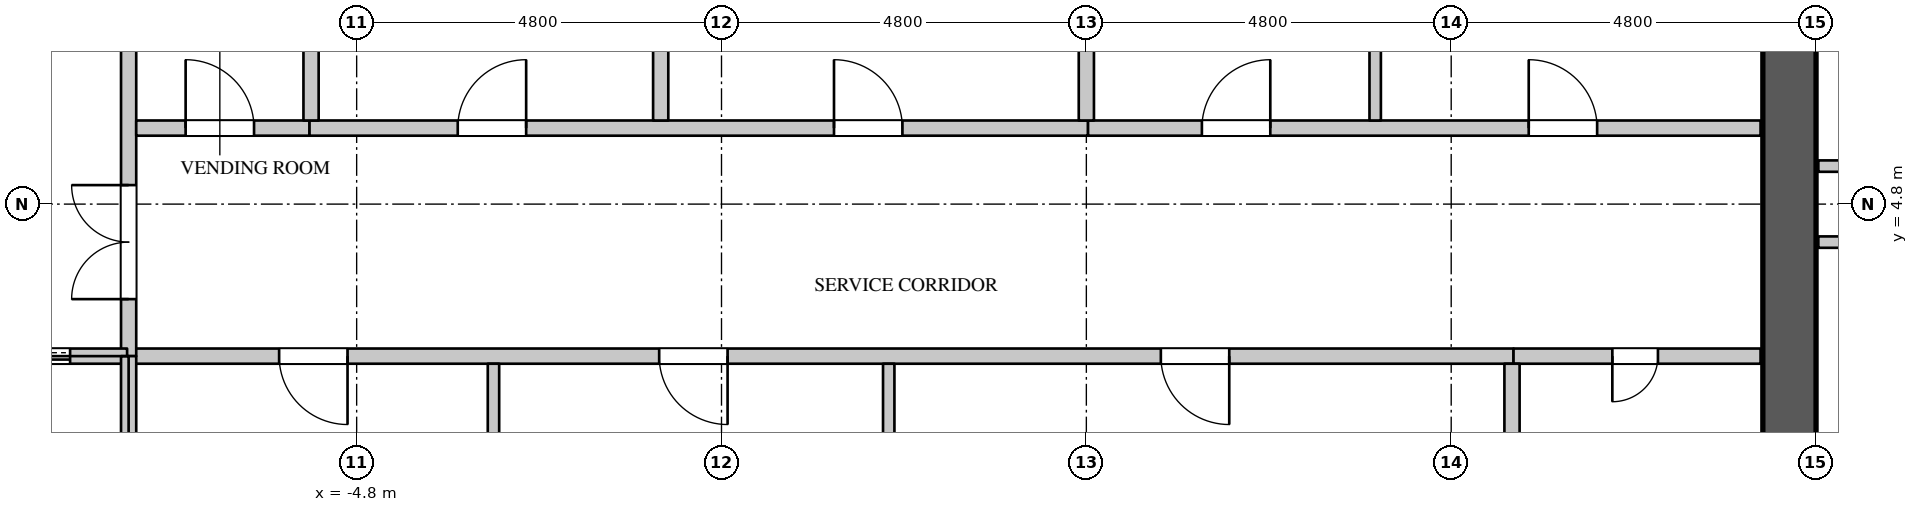
"""IFC4 building model, lengths in metres.
Left out: names, types, materials, properties, quantities, classifications, styles, units other than length and angle.
Written with IfcOpenShell. Run it as: python <this file> out.ifc"""

import sys

from ifc_helpers import new_model, si_unit, direction, frame, frame_2d, origin, place, context, subcontext, project, spatial, rectangle, extrude, element, fill, save


model = new_model("IFC4")
c1 = context("Model", 3, precision=1e-05, world=origin(), true_north=direction((0.0, 1.0)))
c2 = subcontext(c1, "Body", "Model", "MODEL_VIEW")
j1 = project(units=[si_unit("LENGTHUNIT", "METRE"), si_unit("PLANEANGLEUNIT", "RADIAN")], contexts=[c1])
p1 = place(None, origin())
s1 = spatial("IfcSite", under=j1, at=p1, CompositionType="ELEMENT")
p2 = place(p1, origin())
s2 = spatial("IfcBuilding", under=s1, at=p2, CompositionType="ELEMENT")
p3 = place(p2, frame((0.0, 0.0, 208.5)))
s3 = spatial("IfcBuildingStorey", under=s2, at=p3, CompositionType="ELEMENT", Elevation=208.5)
p4 = place(p3, frame((14.05, -11.3, 0.0), z_axis=(0.0, 0.0, 1.0), x_axis=(0.0, 1.0, 0.0)))
e1 = element("IfcWall", 1, at=p4, inside=s3, PredefinedType="SHEAR", context=c2, shape_type="SweptSolid", body=[
    extrude(rectangle(XDim=22.6, YDim=0.7, at=frame_2d((11.3, 0.0))), origin(), (0.0, 0.0, 1.0), 5.4),
])
p5 = place(p4, frame((20.5, 0.0, 0.0)))
e2 = element("IfcOpeningElement", 2, at=p5, cuts=e1, PredefinedType="OPENING", context=c2, shape_type="SweptSolid", body=[
    extrude(rectangle(XDim=1.1, YDim=2.2, at=frame_2d((0.55, 1.1))), frame((0.0, 0.36, 0.0), z_axis=(0.0, -1.0, 0.0), x_axis=(1.0, 0.0, 0.0)), (0.0, 0.0, 1.0), 0.72),
])
p6 = place(p4, frame((7.25, 0.0, 0.0)))
e3 = element("IfcOpeningElement", 3, at=p6, cuts=e1, PredefinedType="OPENING", context=c2, shape_type="SweptSolid", body=[
    extrude(rectangle(XDim=0.9, YDim=2.2, at=frame_2d((0.45, 1.1))), frame((0.0, 0.36, 0.0), z_axis=(0.0, -1.0, 0.0), x_axis=(1.0, 0.0, 0.0)), (0.0, 0.0, 1.0), 0.72),
])
p7 = place(p4, frame((1.0, 0.0, 0.0)))
e4 = element("IfcOpeningElement", 4, at=p7, cuts=e1, PredefinedType="OPENING", context=c2, shape_type="SweptSolid", body=[
    extrude(rectangle(XDim=1.1, YDim=2.2, at=frame_2d((0.55, 1.1))), frame((0.0, 0.36, 0.0), z_axis=(0.0, -1.0, 0.0), x_axis=(1.0, 0.0, 0.0)), (0.0, 0.0, 1.0), 0.72),
])
p8 = place(p4, frame((3.8, 0.0, 0.0)))
e5 = element("IfcOpeningElement", 5, at=p8, cuts=e1, PredefinedType="OPENING", context=c2, shape_type="SweptSolid", body=[
    extrude(rectangle(XDim=0.9, YDim=2.2, at=frame_2d((0.45, 1.1))), frame((0.0, 0.36, 0.0), z_axis=(0.0, -1.0, 0.0), x_axis=(1.0, 0.0, 0.0)), (0.0, 0.0, 1.0), 0.72),
])
p9 = place(p3, frame((-7.82, 2.8, 0.0), z_axis=(0.0, 0.0, 1.0), x_axis=(1.0, 0.0, 0.0)))
e6 = element("IfcWall", 6, at=p9, inside=s3, PredefinedType="PARTITIONING", context=c2, shape_type="SweptSolid", body=[
    extrude(rectangle(XDim=18.24, YDim=0.2, at=frame_2d((9.12, 0.0))), origin(), (0.0, 0.0, 1.0), 5.15),
])
p10 = place(p9, frame((2.0, 0.0, 0.0)))
e7 = element("IfcOpeningElement", 7, at=p10, cuts=e6, PredefinedType="OPENING", context=c2, shape_type="SweptSolid", body=[
    extrude(rectangle(XDim=0.9, YDim=2.2, at=frame_2d((0.45, 1.1))), frame((0.0, 0.11, 0.0), z_axis=(0.0, -1.0, 0.0), x_axis=(1.0, 0.0, 0.0)), (0.0, 0.0, 1.0), 0.22),
])
p11 = place(p9, frame((7.0, 0.0, 0.0)))
e8 = element("IfcOpeningElement", 8, at=p11, cuts=e6, PredefinedType="OPENING", context=c2, shape_type="SweptSolid", body=[
    extrude(rectangle(XDim=0.9, YDim=2.2, at=frame_2d((0.45, 1.1))), frame((0.0, 0.11, 0.0), z_axis=(0.0, -1.0, 0.0), x_axis=(1.0, 0.0, 0.0)), (0.0, 0.0, 1.0), 0.22),
])
p12 = place(p9, frame((13.6, 0.0, 0.0)))
e9 = element("IfcOpeningElement", 9, at=p12, cuts=e6, PredefinedType="OPENING", context=c2, shape_type="SweptSolid", body=[
    extrude(rectangle(XDim=0.9, YDim=2.2, at=frame_2d((0.45, 1.1))), frame((0.0, 0.11, 0.0), z_axis=(0.0, -1.0, 0.0), x_axis=(1.0, 0.0, 0.0)), (0.0, 0.0, 1.0), 0.22),
])
p13 = place(p3, frame((-7.8, 2.8, 0.0), z_axis=(0.0, 0.0, 1.0), x_axis=(0.0, 1.0, 0.0)))
e10 = element("IfcWall", 10, at=p13, inside=s3, PredefinedType="PARTITIONING", context=c2, shape_type="SweptSolid", body=[
    extrude(rectangle(XDim=5.275, YDim=0.2, at=frame_2d((2.637, 0.0))), origin(), (0.0, 0.0, 1.0), 5.15),
])
p14 = place(p13, frame((0.75, 0.0, 0.0)))
e11 = element("IfcOpeningElement", 11, at=p14, cuts=e10, PredefinedType="OPENING", context=c2, shape_type="SweptSolid", body=[
    extrude(rectangle(XDim=1.5, YDim=2.4, at=frame_2d((0.75, 1.2))), frame((0.0, 0.11, 0.0), z_axis=(0.0, -1.0, 0.0), x_axis=(1.0, 0.0, 0.0)), (0.0, 0.0, 1.0), 0.22),
])
p15 = place(p3, frame((-7.7, 5.8, 0.0), z_axis=(0.0, 0.0, 1.0), x_axis=(1.0, 0.0, 0.0)))
e12 = element("IfcWall", 12, at=p15, inside=s3, PredefinedType="PARTITIONING", context=c2, shape_type="SweptSolid", body=[
    extrude(rectangle(XDim=2.28, YDim=0.2, at=frame_2d((1.14, 0.0))), origin(), (0.0, 0.0, 1.0), 5.15),
])
p16 = place(p15, frame((0.65, 0.0, 0.0)))
e13 = element("IfcOpeningElement", 13, at=p16, cuts=e12, PredefinedType="OPENING", context=c2, shape_type="SweptSolid", body=[
    extrude(rectangle(XDim=0.9, YDim=2.2, at=frame_2d((0.45, 1.1))), frame((0.0, 0.11, 0.0), z_axis=(0.0, -1.0, 0.0), x_axis=(1.0, 0.0, 0.0)), (0.0, 0.0, 1.0), 0.22),
])
p17 = place(p3, frame((4.82, 5.8, 0.0), z_axis=(0.0, 0.0, 1.0), x_axis=(1.0, 0.0, 0.0)))
e14 = element("IfcWall", 14, at=p17, inside=s3, PredefinedType="PARTITIONING", context=c2, shape_type="SweptSolid", body=[
    extrude(rectangle(XDim=8.85, YDim=0.2, at=frame_2d((4.425, 0.0))), origin(), (0.0, 0.0, 1.0), 5.15),
])
p18 = place(p17, frame((1.5, 0.0, 0.0)))
e15 = element("IfcOpeningElement", 15, at=p18, cuts=e14, PredefinedType="OPENING", context=c2, shape_type="SweptSolid", body=[
    extrude(rectangle(XDim=0.9, YDim=2.2, at=frame_2d((0.45, 1.1))), frame((0.0, 0.11, 0.0), z_axis=(0.0, -1.0, 0.0), x_axis=(1.0, 0.0, 0.0)), (0.0, 0.0, 1.0), 0.22),
])
p19 = place(p17, frame((5.8, 0.0, 0.0)))
e16 = element("IfcOpeningElement", 16, at=p19, cuts=e14, PredefinedType="OPENING", context=c2, shape_type="SweptSolid", body=[
    extrude(rectangle(XDim=0.9, YDim=2.2, at=frame_2d((0.45, 1.1))), frame((0.0, 0.11, 0.0), z_axis=(0.0, -1.0, 0.0), x_axis=(1.0, 0.0, 0.0)), (0.0, 0.0, 1.0), 0.22),
])
for number, where, z_axis, x_axis in (
    (17, (-3.0, 0.1, 0.0), (0.0, 0.0, 1.0), (0.0, 1.0, 0.0)),
    (18, (2.2, 0.1, 0.0), (0.0, 0.0, 1.0), (0.0, 1.0, 0.0)),
):
    element("IfcWall", number, at=place(p3, frame(where, z_axis=z_axis, x_axis=x_axis)), inside=s3, PredefinedType="PARTITIONING", context=c2, shape_type="SweptSolid", body=[
        extrude(rectangle(XDim=2.6, YDim=0.15, at=frame_2d((1.3, 0.0))), origin(), (0.0, 0.0, 1.0), 5.15),
    ])
p20 = place(p3, frame((8.6, 5.9, 0.0), z_axis=(0.0, 0.0, 1.0), x_axis=(0.0, 1.0, 0.0)))
e19 = element("IfcWall", 19, at=p20, inside=s3, PredefinedType="PARTITIONING", context=c2, shape_type="SweptSolid", body=[
    extrude(rectangle(XDim=2.175, YDim=0.15, at=frame_2d((1.087, 0.0))), origin(), (0.0, 0.0, 1.0), 5.15),
])
p21 = place(p3, frame((14.43, 4.3, 0.0), z_axis=(0.0, 0.0, 1.0), x_axis=(1.0, 0.0, 0.0)))
e20 = element("IfcWall", 20, at=p21, inside=s3, PredefinedType="PARTITIONING", context=c2, shape_type="SweptSolid", body=[
    extrude(rectangle(XDim=5.629, YDim=0.15, at=frame_2d((2.814, 0.0))), origin(), (0.0, 0.0, 1.0), 5.15),
])
p22 = place(p3, frame((14.43, 5.3, 0.0), z_axis=(0.0, 0.0, 1.0), x_axis=(1.0, 0.0, 0.0)))
e21 = element("IfcWall", 21, at=p22, inside=s3, PredefinedType="PARTITIONING", context=c2, shape_type="SweptSolid", body=[
    extrude(rectangle(XDim=9.625, YDim=0.15, at=frame_2d((4.812, 0.0))), origin(), (0.0, 0.0, 1.0), 5.15),
])
p23 = place(p3, frame((-5.42, 5.8, 0.0), z_axis=(0.0, 0.0, 1.0), x_axis=(1.0, 0.0, 0.0)))
e22 = element("IfcWall", 22, at=p23, inside=s3, PredefinedType="PARTITIONING", context=c2, shape_type="SweptSolid", body=[
    extrude(rectangle(XDim=10.24, YDim=0.2, at=frame_2d((5.12, 0.0))), origin(), (0.0, 0.0, 1.0), 5.15),
])
p24 = place(p23, frame((1.95, 0.0, 0.0)))
e23 = element("IfcOpeningElement", 23, at=p24, cuts=e22, PredefinedType="OPENING", context=c2, shape_type="SweptSolid", body=[
    extrude(rectangle(XDim=0.9, YDim=2.2, at=frame_2d((0.45, 1.1))), frame((0.0, 0.11, 0.0), z_axis=(0.0, -1.0, 0.0), x_axis=(1.0, 0.0, 0.0)), (0.0, 0.0, 1.0), 0.22),
])
p25 = place(p23, frame((6.9, 0.0, 0.0)))
e24 = element("IfcOpeningElement", 24, at=p25, cuts=e22, PredefinedType="OPENING", context=c2, shape_type="SweptSolid", body=[
    extrude(rectangle(XDim=0.9, YDim=2.2, at=frame_2d((0.45, 1.1))), frame((0.0, 0.11, 0.0), z_axis=(0.0, -1.0, 0.0), x_axis=(1.0, 0.0, 0.0)), (0.0, 0.0, 1.0), 0.22),
])
p26 = place(p3, frame((-5.4, 5.9, 0.0), z_axis=(0.0, 0.0, 1.0), x_axis=(0.0, 1.0, 0.0)))
e25 = element("IfcWall", 25, at=p26, inside=s3, PredefinedType="PARTITIONING", context=c2, shape_type="SweptSolid", body=[
    extrude(rectangle(XDim=2.3, YDim=0.2, at=frame_2d((1.15, 0.0))), origin(), (0.0, 0.0, 1.0), 5.15),
])
for number, where, z_axis, x_axis in (
    (26, (-0.8, 5.9, 0.0), (0.0, 0.0, 1.0), (0.0, 1.0, 0.0)),
    (27, (4.8, 5.9, 0.0), (0.0, 0.0, 1.0), (0.0, 1.0, 0.0)),
):
    element("IfcWall", number, at=place(p3, frame(where, z_axis=z_axis, x_axis=x_axis)), inside=s3, PredefinedType="PARTITIONING", context=c2, shape_type="SweptSolid", body=[
        extrude(rectangle(XDim=5.37, YDim=0.2, at=frame_2d((2.685, 0.0))), origin(), (0.0, 0.0, 1.0), 5.15),
    ])
p27 = place(p3, frame((10.42, 2.8, 0.0), z_axis=(0.0, 0.0, 1.0), x_axis=(1.0, 0.0, 0.0)))
e28 = element("IfcWall", 28, at=p27, inside=s3, PredefinedType="PARTITIONING", context=c2, shape_type="SweptSolid", body=[
    extrude(rectangle(XDim=3.25, YDim=0.2, at=frame_2d((1.625, 0.0))), origin(), (0.0, 0.0, 1.0), 5.15),
])
p28 = place(p27, frame((1.3, 0.0, 0.0)))
e29 = element("IfcOpeningElement", 29, at=p28, cuts=e28, PredefinedType="OPENING", context=c2, shape_type="SweptSolid", body=[
    extrude(rectangle(XDim=0.6, YDim=2.0, at=frame_2d((0.3, 1.0))), frame((0.0, 0.11, 0.0), z_axis=(0.0, -1.0, 0.0), x_axis=(1.0, 0.0, 0.0)), (0.0, 0.0, 1.0), 0.22),
])
p29 = place(p3, frame((10.4, 0.1, 0.0), z_axis=(0.0, 0.0, 1.0), x_axis=(0.0, 1.0, 0.0)))
e30 = element("IfcWall", 30, at=p29, inside=s3, PredefinedType="PARTITIONING", context=c2, shape_type="SweptSolid", body=[
    extrude(rectangle(XDim=2.6, YDim=0.2, at=frame_2d((1.3, 0.0))), origin(), (0.0, 0.0, 1.0), 5.15),
])
p30 = place(p3, frame((-13.67, 2.8, 0.0), z_axis=(0.0, 0.0, 1.0), x_axis=(1.0, 0.0, 0.0)))
e31 = element("IfcWall", 31, at=p30, inside=s3, PredefinedType="PARTITIONING", context=c2, shape_type="SweptSolid", body=[
    extrude(rectangle(XDim=5.85, YDim=0.2, at=frame_2d((2.925, 0.0))), origin(), (0.0, 0.0, 1.0), 5.15),
])
p31 = place(p30, frame((1.05, 0.0, 0.0)))
e32 = element("IfcOpeningElement", 32, at=p31, cuts=e31, PredefinedType="OPENING", context=c2, shape_type="SweptSolid", body=[
    extrude(rectangle(XDim=1.1, YDim=2.2, at=frame_2d((0.55, 1.1))), frame((0.0, 0.11, 0.0), z_axis=(0.0, -1.0, 0.0), x_axis=(1.0, 0.0, 0.0)), (0.0, 0.0, 1.0), 0.22),
])
p32 = place(p30, frame((4.0, 0.0, 0.0)))
e33 = element("IfcOpeningElement", 33, at=p32, cuts=e31, PredefinedType="OPENING", context=c2, shape_type="SweptSolid", body=[
    extrude(rectangle(XDim=1.1, YDim=2.2, at=frame_2d((0.55, 1.1))), frame((0.0, 0.11, 0.0), z_axis=(0.0, -1.0, 0.0), x_axis=(1.0, 0.0, 0.0)), (0.0, 0.0, 1.0), 0.22),
])
p33 = place(p3, frame((-7.8, 0.0, 0.0), z_axis=(0.0, 0.0, 1.0), x_axis=(0.0, 1.0, 0.0)))
e34 = element("IfcWall", 34, at=p33, inside=s3, PredefinedType="PARTITIONING", context=c2, shape_type="SweptSolid", body=[
    extrude(rectangle(XDim=2.8, YDim=0.2, at=frame_2d((1.4, 0.0))), origin(), (0.0, 0.0, 1.0), 5.15),
])
p34 = place(p28, origin())
e35 = element("IfcDoor", 35, at=p34, inside=s3, OperationType="SINGLE_SWING_RIGHT", PredefinedType="DOOR", context=c2, shape_type="SweptSolid", body=[
    extrude(rectangle(XDim=0.6, YDim=2.0, at=frame_2d((0.3, 1.0))), frame((0.0, 0.025, 0.0), z_axis=(0.0, -1.0, 0.0), x_axis=(1.0, 0.0, 0.0)), (0.0, 0.0, 1.0), 0.05),
])
fill(e29, e35)
p35 = place(p16, origin())
e36 = element("IfcDoor", 36, at=p35, inside=s3, OperationType="SINGLE_SWING_LEFT", PredefinedType="DOOR", context=c2, shape_type="SweptSolid", body=[
    extrude(rectangle(XDim=0.9, YDim=2.2, at=frame_2d((0.45, 1.1))), frame((0.0, 0.025, 0.0), z_axis=(0.0, -1.0, 0.0), x_axis=(1.0, 0.0, 0.0)), (0.0, 0.0, 1.0), 0.05),
])
fill(e13, e36)
p36 = place(p24, origin())
e37 = element("IfcDoor", 37, at=p36, inside=s3, OperationType="SINGLE_SWING_RIGHT", PredefinedType="DOOR", context=c2, shape_type="SweptSolid", body=[
    extrude(rectangle(XDim=0.9, YDim=2.2, at=frame_2d((0.45, 1.1))), frame((0.0, 0.025, 0.0), z_axis=(0.0, -1.0, 0.0), x_axis=(1.0, 0.0, 0.0)), (0.0, 0.0, 1.0), 0.05),
])
fill(e23, e37)
p37 = place(p25, origin())
e38 = element("IfcDoor", 38, at=p37, inside=s3, OperationType="SINGLE_SWING_LEFT", PredefinedType="DOOR", context=c2, shape_type="SweptSolid", body=[
    extrude(rectangle(XDim=0.9, YDim=2.2, at=frame_2d((0.45, 1.1))), frame((0.0, 0.025, 0.0), z_axis=(0.0, -1.0, 0.0), x_axis=(1.0, 0.0, 0.0)), (0.0, 0.0, 1.0), 0.05),
])
fill(e24, e38)
p38 = place(p18, origin())
e39 = element("IfcDoor", 39, at=p38, inside=s3, OperationType="SINGLE_SWING_RIGHT", PredefinedType="DOOR", context=c2, shape_type="SweptSolid", body=[
    extrude(rectangle(XDim=0.9, YDim=2.2, at=frame_2d((0.45, 1.1))), frame((0.0, 0.025, 0.0), z_axis=(0.0, -1.0, 0.0), x_axis=(1.0, 0.0, 0.0)), (0.0, 0.0, 1.0), 0.05),
])
fill(e15, e39)
p39 = place(p19, origin())
e40 = element("IfcDoor", 40, at=p39, inside=s3, OperationType="SINGLE_SWING_LEFT", PredefinedType="DOOR", context=c2, shape_type="SweptSolid", body=[
    extrude(rectangle(XDim=0.9, YDim=2.2, at=frame_2d((0.45, 1.1))), frame((0.0, 0.025, 0.0), z_axis=(0.0, -1.0, 0.0), x_axis=(1.0, 0.0, 0.0)), (0.0, 0.0, 1.0), 0.05),
])
fill(e16, e40)
p40 = place(p10, origin())
e41 = element("IfcDoor", 41, at=p40, inside=s3, OperationType="SINGLE_SWING_LEFT", PredefinedType="DOOR", context=c2, shape_type="SweptSolid", body=[
    extrude(rectangle(XDim=0.9, YDim=2.2, at=frame_2d((0.45, 1.1))), frame((0.0, 0.025, 0.0), z_axis=(0.0, -1.0, 0.0), x_axis=(1.0, 0.0, 0.0)), (0.0, 0.0, 1.0), 0.05),
])
fill(e7, e41)
p41 = place(p11, origin())
e42 = element("IfcDoor", 42, at=p41, inside=s3, OperationType="SINGLE_SWING_LEFT", PredefinedType="DOOR", context=c2, shape_type="SweptSolid", body=[
    extrude(rectangle(XDim=0.9, YDim=2.2, at=frame_2d((0.45, 1.1))), frame((0.0, 0.025, 0.0), z_axis=(0.0, -1.0, 0.0), x_axis=(1.0, 0.0, 0.0)), (0.0, 0.0, 1.0), 0.05),
])
fill(e8, e42)
p42 = place(p12, origin())
e43 = element("IfcDoor", 43, at=p42, inside=s3, OperationType="SINGLE_SWING_LEFT", PredefinedType="DOOR", context=c2, shape_type="SweptSolid", body=[
    extrude(rectangle(XDim=0.9, YDim=2.2, at=frame_2d((0.45, 1.1))), frame((0.0, 0.025, 0.0), z_axis=(0.0, -1.0, 0.0), x_axis=(1.0, 0.0, 0.0)), (0.0, 0.0, 1.0), 0.05),
])
fill(e9, e43)
p43 = place(p32, origin())
e44 = element("IfcDoor", 44, at=p43, inside=s3, OperationType="DOUBLE_DOOR_SLIDING", PredefinedType="DOOR", context=c2, shape_type="SweptSolid", body=[
    extrude(rectangle(XDim=1.1, YDim=2.2, at=frame_2d((0.55, 1.1))), frame((0.0, 0.025, 0.0), z_axis=(0.0, -1.0, 0.0), x_axis=(1.0, 0.0, 0.0)), (0.0, 0.0, 1.0), 0.05),
])
fill(e33, e44)
p44 = place(p14, origin())
e45 = element("IfcDoor", 45, at=p44, inside=s3, OperationType="DOUBLE_DOOR_SINGLE_SWING", PredefinedType="DOOR", context=c2, shape_type="SweptSolid", body=[
    extrude(rectangle(XDim=1.5, YDim=2.4, at=frame_2d((0.75, 1.2))), frame((0.0, 0.025, 0.0), z_axis=(0.0, -1.0, 0.0), x_axis=(1.0, 0.0, 0.0)), (0.0, 0.0, 1.0), 0.05),
])
fill(e11, e45)
save(model, sys.argv[1])
